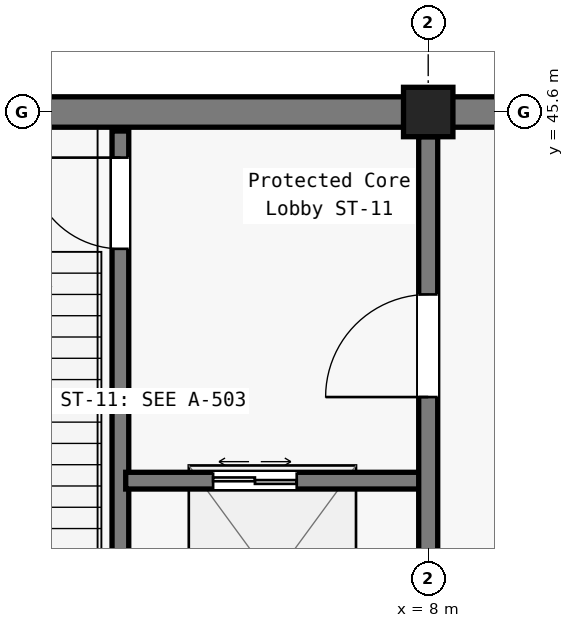
"""IFC4 building model, lengths in metres.
Left out: names, types, materials, properties, quantities, classifications, styles, units other than length and angle.
Written with IfcOpenShell. Run it as: python <this file> out.ifc"""

import sys

from ifc_helpers import new_model, si_unit, direction, frame, frame_2d, origin, origin_2d, place, context, subcontext, project, spatial, rectangle, circle, extrude, element, fill, save


model = new_model("IFC4")
c1 = context("Model", 3, precision=1e-05, world=origin(), true_north=direction((0.0, 1.0)))
c2 = subcontext(c1, "Body", "Model", "MODEL_VIEW")
j1 = project(units=[si_unit("LENGTHUNIT", "METRE"), si_unit("PLANEANGLEUNIT", "RADIAN")], contexts=[c1])
p1 = place(None, origin())
s1 = spatial("IfcSite", under=j1, at=p1, CompositionType="ELEMENT")
p2 = place(p1, origin())
s2 = spatial("IfcBuilding", under=s1, at=p2, CompositionType="ELEMENT")
p3 = place(p2, frame((0.0, 0.0, -5.4)))
s3 = spatial("IfcBuildingStorey", under=s2, at=p3, CompositionType="ELEMENT", Elevation=-5.4)
for number, where, z_axis, x_axis in (
    (1, (8.0, 45.6, 0.0), (0.0, 0.0, 1.0), (-1.0, 0.0, 0.0)),
    (2, (16.0, 45.6, 0.0), (0.0, 0.0, 1.0), (-1.0, 0.0, 0.0)),
):
    element("IfcWall", number, at=place(p3, frame(where, z_axis=z_axis, x_axis=x_axis)), inside=s3, PredefinedType="USERDEFINED", context=c2, shape_type="SweptSolid", body=[
        extrude(rectangle(XDim=8.0, YDim=0.4, at=frame_2d((4.0, 0.0))), origin(), (0.0, 0.0, 1.0), 5.08),
    ])
p4 = place(p3, frame((8.0, 45.6, 0.0), z_axis=(0.0, 0.0, 1.0), x_axis=(1.0, 0.0, 0.0)))
e3 = element("IfcColumn", 3, at=p4, inside=s3, PredefinedType="COLUMN", context=c2, shape_type="SweptSolid", body=[
    extrude(circle(Radius=0.325, at=origin_2d()), origin(), (0.0, 0.0, 1.0), 5.4),
])
p5 = place(p3, frame((3.95, 38.25, 0.0), z_axis=(0.0, 0.0, 1.0), x_axis=(0.0, 1.0, 0.0)))
e4 = element("IfcWall", 4, at=p5, inside=s3, PredefinedType="SOLIDWALL", context=c2, shape_type="SweptSolid", body=[
    extrude(rectangle(XDim=7.1, YDim=0.22, at=frame_2d((3.55, 0.0))), origin(), (0.0, 0.0, 1.0), 5.08),
])
p6 = place(p5, frame((5.55, 0.0, 0.0)))
e5 = element("IfcOpeningElement", 5, at=p6, cuts=e4, PredefinedType="OPENING", context=c2, shape_type="SweptSolid", body=[
    extrude(rectangle(XDim=1.2, YDim=2.15, at=frame_2d((0.6, 1.075))), frame((0.0, 0.12, 0.0), z_axis=(0.0, -1.0, 0.0), x_axis=(1.0, 0.0, 0.0)), (0.0, 0.0, 1.0), 0.24),
])
p7 = place(p3, frame((4.02, 40.75, 0.0), z_axis=(0.0, 0.0, 1.0), x_axis=(1.0, 0.0, 0.0)))
e6 = element("IfcWall", 6, at=p7, inside=s3, PredefinedType="SOLIDWALL", context=c2, shape_type="SweptSolid", body=[
    extrude(rectangle(XDim=3.93, YDim=0.22, at=frame_2d((1.965, 0.0))), origin(), (0.0, 0.0, 1.0), 4.43),
])
p8 = place(p7, frame((1.15, 0.0, 0.0)))
e7 = element("IfcOpeningElement", 7, at=p8, cuts=e6, PredefinedType="OPENING", context=c2, shape_type="SweptSolid", body=[
    extrude(rectangle(XDim=1.1, YDim=2.2, at=frame_2d((0.55, 1.1))), frame((0.0, 0.12, 0.0), z_axis=(0.0, -1.0, 0.0), x_axis=(1.0, 0.0, 0.0)), (0.0, 0.0, 1.0), 0.24),
])
p9 = place(p3, frame((8.0, 38.4, 0.0), z_axis=(0.0, 0.0, 1.0), x_axis=(0.0, 1.0, 0.0)))
e8 = element("IfcWall", 8, at=p9, inside=s3, PredefinedType="SOLIDWALL", context=c2, shape_type="SweptSolid", body=[
    extrude(rectangle(XDim=6.875, YDim=0.25, at=frame_2d((3.438, 0.0))), origin(), (0.0, 0.0, 1.0), 4.255),
])
p10 = place(p9, frame((3.45, 0.0, 0.0)))
e9 = element("IfcOpeningElement", 9, at=p10, cuts=e8, PredefinedType="OPENING", context=c2, shape_type="SweptSolid", body=[
    extrude(rectangle(XDim=1.35, YDim=2.2, at=frame_2d((0.675, 1.1))), frame((0.0, 0.135, 0.0), z_axis=(0.0, -1.0, 0.0), x_axis=(1.0, 0.0, 0.0)), (0.0, 0.0, 1.0), 0.27),
])
p11 = place(p6, origin())
e10 = element("IfcDoor", 10, at=p11, inside=s3, OperationType="SINGLE_SWING_RIGHT", PredefinedType="DOOR", context=c2, shape_type="SweptSolid", body=[
    extrude(rectangle(XDim=1.2, YDim=2.15, at=frame_2d((0.6, 1.075))), frame((0.0, 0.025, 0.0), z_axis=(0.0, -1.0, 0.0), x_axis=(1.0, 0.0, 0.0)), (0.0, 0.0, 1.0), 0.05),
])
fill(e5, e10)
p12 = place(p8, origin())
e11 = element("IfcDoor", 11, at=p12, inside=s3, OperationType="DOUBLE_DOOR_SLIDING", PredefinedType="DOOR", context=c2, shape_type="SweptSolid", body=[
    extrude(rectangle(XDim=1.1, YDim=2.2, at=frame_2d((0.55, 1.1))), frame((0.0, 0.025, 0.0), z_axis=(0.0, -1.0, 0.0), x_axis=(1.0, 0.0, 0.0)), (0.0, 0.0, 1.0), 0.05),
])
fill(e7, e11)
p13 = place(p10, origin())
e12 = element("IfcDoor", 12, at=p13, inside=s3, OperationType="SINGLE_SWING_LEFT", PredefinedType="DOOR", context=c2, shape_type="SweptSolid", body=[
    extrude(rectangle(XDim=1.35, YDim=2.2, at=frame_2d((0.675, 1.1))), frame((0.0, 0.025, 0.0), z_axis=(0.0, -1.0, 0.0), x_axis=(1.0, 0.0, 0.0)), (0.0, 0.0, 1.0), 0.05),
])
fill(e9, e12)
save(model, sys.argv[1])
